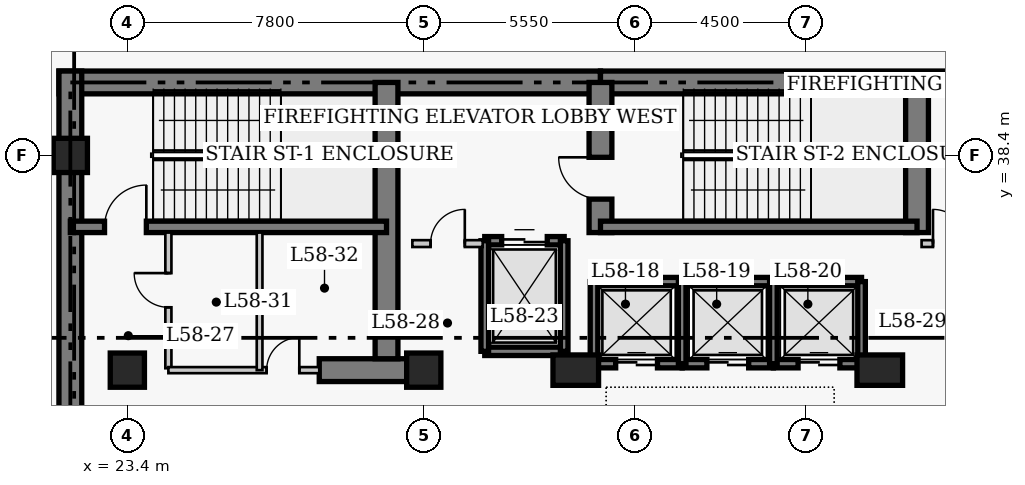
"""IFC4 building model, lengths in metres.
Left out: names, types, materials, properties, quantities, classifications, styles, units other than length and angle.
Written with IfcOpenShell. Run it as: python <this file> out.ifc"""

import sys

from ifc_helpers import new_model, si_unit, direction, frame, frame_2d, origin, origin_2d, place, context, subcontext, project, spatial, rectangle, extrude, element, fill, save


model = new_model("IFC4")
c1 = context("Model", 3, precision=1e-05, world=origin(), true_north=direction((0.0, 1.0)))
c2 = subcontext(c1, "Body", "Model", "MODEL_VIEW")
j1 = project(units=[si_unit("LENGTHUNIT", "METRE"), si_unit("PLANEANGLEUNIT", "RADIAN")], contexts=[c1])
p1 = place(None, origin())
s1 = spatial("IfcSite", under=j1, at=p1, CompositionType="ELEMENT")
p2 = place(p1, origin())
s2 = spatial("IfcBuilding", under=s1, at=p2, CompositionType="ELEMENT")
p3 = place(p2, frame((0.0, 0.0, 231.9)))
s3 = spatial("IfcBuildingStorey", under=s2, at=p3, CompositionType="ELEMENT", Elevation=231.9)
p4 = place(p3, frame((21.6, 40.32, 0.0), z_axis=(0.0, 0.0, 1.0), x_axis=(1.0, 0.0, 0.0)))
e1 = element("IfcWall", 1, at=p4, inside=s3, PredefinedType="SHEAR", context=c2, shape_type="SweptSolid", body=[
    extrude(rectangle(XDim=14.25, YDim=0.6, at=frame_2d((7.125, 0.0))), origin(), (0.0, 0.0, 1.0), 4.6),
])
p5 = place(p3, frame((35.85, 40.32, 0.0), z_axis=(0.0, 0.0, 1.0), x_axis=(1.0, 0.0, 0.0)))
e2 = element("IfcWall", 2, at=p5, inside=s3, PredefinedType="SHEAR", context=c2, shape_type="SweptSolid", body=[
    extrude(rectangle(XDim=12.6, YDim=0.6, at=frame_2d((6.3, 0.0))), origin(), (0.0, 0.0, 1.0), 4.6),
])
p6 = place(p3, frame((21.9, 27.05, 0.0), z_axis=(0.0, 0.0, 1.0), x_axis=(0.0, 1.0, 0.0)))
e3 = element("IfcWall", 3, at=p6, inside=s3, PredefinedType="SHEAR", context=c2, shape_type="SweptSolid", body=[
    extrude(rectangle(XDim=13.57, YDim=0.6, at=frame_2d((6.785, 0.0))), origin(), (0.0, 0.0, 1.0), 4.6),
])
p7 = place(p3, frame((28.45, 32.75, 0.0), z_axis=(0.0, 0.0, 1.0), x_axis=(1.0, 0.0, 0.0)))
e4 = element("IfcWall", 4, at=p7, inside=s3, PredefinedType="SHEAR", context=c2, shape_type="SweptSolid", body=[
    extrude(rectangle(XDim=2.4, YDim=0.6, at=frame_2d((1.2, 0.0))), origin(), (0.0, 0.0, 1.0), 4.6),
])
p8 = place(p3, frame((30.22, 33.05, 0.0), z_axis=(0.0, 0.0, 1.0), x_axis=(0.0, 1.0, 0.0)))
e5 = element("IfcWall", 5, at=p8, inside=s3, PredefinedType="SHEAR", context=c2, shape_type="SweptSolid", body=[
    extrude(rectangle(XDim=7.27, YDim=0.6, at=frame_2d((3.635, 0.0))), origin(), (0.0, 0.0, 1.0), 4.6),
])
p9 = place(p3, frame((35.85, 36.37, 0.0), z_axis=(0.0, 0.0, 1.0), x_axis=(0.0, 1.0, 0.0)))
e6 = element("IfcWall", 6, at=p9, inside=s3, PredefinedType="SHEAR", context=c2, shape_type="SweptSolid", body=[
    extrude(rectangle(XDim=3.95, YDim=0.6, at=frame_2d((1.975, 0.0))), origin(), (0.0, 0.0, 1.0), 4.6),
])
p10 = place(p9, frame((0.88, 0.0, 0.0)))
e7 = element("IfcOpeningElement", 7, at=p10, cuts=e6, PredefinedType="OPENING", context=c2, shape_type="SweptSolid", body=[
    extrude(rectangle(XDim=1.1, YDim=2.15, at=frame_2d((0.55, 1.075))), frame((0.0, 0.31, 0.0), z_axis=(0.0, -1.0, 0.0), x_axis=(1.0, 0.0, 0.0)), (0.0, 0.0, 1.0), 0.62),
])
p11 = place(p3, frame((44.18, 36.37, 0.0), z_axis=(0.0, 0.0, 1.0), x_axis=(0.0, 1.0, 0.0)))
e8 = element("IfcWall", 8, at=p11, inside=s3, PredefinedType="SHEAR", context=c2, shape_type="SweptSolid", body=[
    extrude(rectangle(XDim=3.95, YDim=0.6, at=frame_2d((1.975, 0.0))), origin(), (0.0, 0.0, 1.0), 4.6),
])
p12 = place(p3, frame((21.9, 36.52, 0.0), z_axis=(0.0, 0.0, 1.0), x_axis=(1.0, 0.0, 0.0)))
e9 = element("IfcWall", 9, at=p12, inside=s3, PredefinedType="SHEAR", context=c2, shape_type="SweptSolid", body=[
    extrude(rectangle(XDim=8.32, YDim=0.3, at=frame_2d((4.16, 0.0))), origin(), (0.0, 0.0, 1.0), 4.6),
])
p13 = place(p12, frame((0.9, 0.0, 0.0)))
e10 = element("IfcOpeningElement", 10, at=p13, cuts=e9, PredefinedType="OPENING", context=c2, shape_type="SweptSolid", body=[
    extrude(rectangle(XDim=1.1, YDim=2.15, at=frame_2d((0.55, 1.075))), frame((0.0, 0.16, 0.0), z_axis=(0.0, -1.0, 0.0), x_axis=(1.0, 0.0, 0.0)), (0.0, 0.0, 1.0), 0.32),
])
p14 = place(p3, frame((35.85, 36.52, 0.0), z_axis=(0.0, 0.0, 1.0), x_axis=(1.0, 0.0, 0.0)))
e11 = element("IfcWall", 11, at=p14, inside=s3, PredefinedType="SHEAR", context=c2, shape_type="SweptSolid", body=[
    extrude(rectangle(XDim=8.33, YDim=0.3, at=frame_2d((4.165, 0.0))), origin(), (0.0, 0.0, 1.0), 4.6),
])
for number, where, z_axis, x_axis in (
    (12, (21.9, 38.4, 0.0), (0.0, 0.0, 1.0), (1.0, 0.0, 0.0)),
    (13, (23.4, 32.75, 0.0), (0.0, 0.0, 1.0), (1.0, 0.0, 0.0)),
    (14, (31.2, 32.75, 0.0), (0.0, 0.0, 1.0), (1.0, 0.0, 0.0)),
):
    element("IfcColumn", number, at=place(p3, frame(where, z_axis=z_axis, x_axis=x_axis)), inside=s3, PredefinedType="COLUMN", context=c2, shape_type="SweptSolid", body=[
        extrude(rectangle(XDim=0.9, YDim=0.9, at=origin_2d()), origin(), (0.0, 0.0, 1.0), 4.6),
    ])
for number, where, z_axis, x_axis in (
    (15, (35.2, 32.75, 0.0), (0.0, 0.0, 1.0), (1.0, 0.0, 0.0)),
    (16, (43.2, 32.75, 0.0), (0.0, 0.0, 1.0), (1.0, 0.0, 0.0)),
):
    element("IfcColumn", number, at=place(p3, frame(where, z_axis=z_axis, x_axis=x_axis)), inside=s3, PredefinedType="COLUMN", context=c2, shape_type="SweptSolid", body=[
        extrude(rectangle(XDim=1.2, YDim=0.8, at=origin_2d()), origin(), (0.0, 0.0, 1.0), 4.6),
    ])
p15 = place(p3, frame((35.68, 35.08, 0.0), z_axis=(0.0, 0.0, 1.0), x_axis=(1.0, 0.0, 0.0)))
e17 = element("IfcWall", 17, at=p15, inside=s3, PredefinedType="SHEAR", context=c2, shape_type="SweptSolid", body=[
    extrude(rectangle(XDim=2.32, YDim=0.22, at=frame_2d((1.16, 0.0))), origin(), (0.0, 0.0, 1.0), 4.6),
])
p16 = place(p3, frame((35.68, 32.92, 0.0), z_axis=(0.0, 0.0, 1.0), x_axis=(1.0, 0.0, 0.0)))
e18 = element("IfcWall", 18, at=p16, inside=s3, PredefinedType="SHEAR", context=c2, shape_type="SweptSolid", body=[
    extrude(rectangle(XDim=2.32, YDim=0.22, at=frame_2d((1.16, 0.0))), origin(), (0.0, 0.0, 1.0), 4.6),
])
p17 = place(p16, frame((0.57, 0.0, 0.0)))
e19 = element("IfcOpeningElement", 19, at=p17, cuts=e18, PredefinedType="OPENING", context=c2, shape_type="SweptSolid", body=[
    extrude(rectangle(XDim=1.1, YDim=2.15, at=frame_2d((0.55, 1.075))), frame((0.0, 0.12, 0.0), z_axis=(0.0, -1.0, 0.0), x_axis=(1.0, 0.0, 0.0)), (0.0, 0.0, 1.0), 0.24),
])
p18 = place(p3, frame((35.68, 32.92, 0.0), z_axis=(0.0, 0.0, 1.0), x_axis=(0.0, 1.0, 0.0)))
e20 = element("IfcWall", 20, at=p18, inside=s3, PredefinedType="SHEAR", context=c2, shape_type="SweptSolid", body=[
    extrude(rectangle(XDim=2.16, YDim=0.2, at=frame_2d((1.08, 0.0))), origin(), (0.0, 0.0, 1.0), 4.6),
])
p19 = place(p3, frame((38.0, 35.08, 0.0), z_axis=(0.0, 0.0, 1.0), x_axis=(1.0, 0.0, 0.0)))
e21 = element("IfcWall", 21, at=p19, inside=s3, PredefinedType="SHEAR", context=c2, shape_type="SweptSolid", body=[
    extrude(rectangle(XDim=2.4, YDim=0.22, at=frame_2d((1.2, 0.0))), origin(), (0.0, 0.0, 1.0), 4.6),
])
p20 = place(p3, frame((38.0, 32.92, 0.0), z_axis=(0.0, 0.0, 1.0), x_axis=(1.0, 0.0, 0.0)))
e22 = element("IfcWall", 22, at=p20, inside=s3, PredefinedType="SHEAR", context=c2, shape_type="SweptSolid", body=[
    extrude(rectangle(XDim=2.4, YDim=0.22, at=frame_2d((1.2, 0.0))), origin(), (0.0, 0.0, 1.0), 4.6),
])
p21 = place(p20, frame((0.65, 0.0, 0.0)))
e23 = element("IfcOpeningElement", 23, at=p21, cuts=e22, PredefinedType="OPENING", context=c2, shape_type="SweptSolid", body=[
    extrude(rectangle(XDim=1.1, YDim=2.15, at=frame_2d((0.55, 1.075))), frame((0.0, 0.12, 0.0), z_axis=(0.0, -1.0, 0.0), x_axis=(1.0, 0.0, 0.0)), (0.0, 0.0, 1.0), 0.24),
])
p22 = place(p3, frame((38.0, 32.92, 0.0), z_axis=(0.0, 0.0, 1.0), x_axis=(0.0, 1.0, 0.0)))
e24 = element("IfcWall", 24, at=p22, inside=s3, PredefinedType="SHEAR", context=c2, shape_type="SweptSolid", body=[
    extrude(rectangle(XDim=2.16, YDim=0.2, at=frame_2d((1.08, 0.0))), origin(), (0.0, 0.0, 1.0), 4.6),
])
p23 = place(p3, frame((40.4, 35.08, 0.0), z_axis=(0.0, 0.0, 1.0), x_axis=(1.0, 0.0, 0.0)))
e25 = element("IfcWall", 25, at=p23, inside=s3, PredefinedType="SHEAR", context=c2, shape_type="SweptSolid", body=[
    extrude(rectangle(XDim=2.32, YDim=0.22, at=frame_2d((1.16, 0.0))), origin(), (0.0, 0.0, 1.0), 4.6),
])
p24 = place(p3, frame((40.4, 32.92, 0.0), z_axis=(0.0, 0.0, 1.0), x_axis=(1.0, 0.0, 0.0)))
e26 = element("IfcWall", 26, at=p24, inside=s3, PredefinedType="SHEAR", context=c2, shape_type="SweptSolid", body=[
    extrude(rectangle(XDim=2.32, YDim=0.22, at=frame_2d((1.16, 0.0))), origin(), (0.0, 0.0, 1.0), 4.6),
])
p25 = place(p24, frame((0.65, 0.0, 0.0)))
e27 = element("IfcOpeningElement", 27, at=p25, cuts=e26, PredefinedType="OPENING", context=c2, shape_type="SweptSolid", body=[
    extrude(rectangle(XDim=1.1, YDim=2.15, at=frame_2d((0.55, 1.075))), frame((0.0, 0.12, 0.0), z_axis=(0.0, -1.0, 0.0), x_axis=(1.0, 0.0, 0.0)), (0.0, 0.0, 1.0), 0.24),
])
for number, where, z_axis, x_axis in (
    (28, (40.4, 32.92, 0.0), (0.0, 0.0, 1.0), (0.0, 1.0, 0.0)),
    (29, (42.72, 32.92, 0.0), (0.0, 0.0, 1.0), (0.0, 1.0, 0.0)),
):
    element("IfcWall", number, at=place(p3, frame(where, z_axis=z_axis, x_axis=x_axis)), inside=s3, PredefinedType="SHEAR", context=c2, shape_type="SweptSolid", body=[
        extrude(rectangle(XDim=2.16, YDim=0.2, at=frame_2d((1.08, 0.0))), origin(), (0.0, 0.0, 1.0), 4.6),
    ])
p26 = place(p3, frame((32.805, 36.155, 0.0), z_axis=(0.0, 0.0, 1.0), x_axis=(1.0, 0.0, 0.0)))
e30 = element("IfcWall", 30, at=p26, inside=s3, PredefinedType="SHEAR", context=c2, shape_type="SweptSolid", body=[
    extrude(rectangle(XDim=2.09, YDim=0.22, at=frame_2d((1.045, 0.0))), origin(), (0.0, 0.0, 1.0), 4.6),
])
p27 = place(p26, frame((0.445, 0.0, 0.0)))
e31 = element("IfcOpeningElement", 31, at=p27, cuts=e30, PredefinedType="OPENING", context=c2, shape_type="SweptSolid", body=[
    extrude(rectangle(XDim=1.2, YDim=2.15, at=frame_2d((0.6, 1.075))), frame((0.0, 0.12, 0.0), z_axis=(0.0, -1.0, 0.0), x_axis=(1.0, 0.0, 0.0)), (0.0, 0.0, 1.0), 0.24),
])
p28 = place(p3, frame((32.805, 33.245, 0.0), z_axis=(0.0, 0.0, 1.0), x_axis=(1.0, 0.0, 0.0)))
e32 = element("IfcWall", 32, at=p28, inside=s3, PredefinedType="SHEAR", context=c2, shape_type="SweptSolid", body=[
    extrude(rectangle(XDim=2.09, YDim=0.22, at=frame_2d((1.045, 0.0))), origin(), (0.0, 0.0, 1.0), 4.6),
])
for number, where, z_axis, x_axis in (
    (33, (32.805, 33.245, 0.0), (0.0, 0.0, 1.0), (0.0, 1.0, 0.0)),
    (34, (34.895, 33.245, 0.0), (0.0, 0.0, 1.0), (0.0, 1.0, 0.0)),
):
    element("IfcWall", number, at=place(p3, frame(where, z_axis=z_axis, x_axis=x_axis)), inside=s3, PredefinedType="SHEAR", context=c2, shape_type="SweptSolid", body=[
        extrude(rectangle(XDim=2.91, YDim=0.2, at=frame_2d((1.455, 0.0))), origin(), (0.0, 0.0, 1.0), 4.6),
    ])
p29 = place(p3, frame((30.9, 36.08, 0.0), z_axis=(0.0, 0.0, 1.0), x_axis=(1.0, 0.0, 0.0)))
e35 = element("IfcWall", 35, at=p29, inside=s3, PredefinedType="PARTITIONING", context=c2, shape_type="SweptSolid", body=[
    extrude(rectangle(XDim=1.85, YDim=0.18, at=frame_2d((0.925, 0.0))), origin(), (0.0, 0.0, 1.0), 4.35),
])
p30 = place(p29, frame((0.48, 0.0, 0.0)))
e36 = element("IfcOpeningElement", 36, at=p30, cuts=e35, PredefinedType="OPENING", context=c2, shape_type="SweptSolid", body=[
    extrude(rectangle(XDim=0.9, YDim=2.15, at=frame_2d((0.45, 1.075))), frame((0.0, 0.1, 0.0), z_axis=(0.0, -1.0, 0.0), x_axis=(1.0, 0.0, 0.0)), (0.0, 0.0, 1.0), 0.2),
])
p31 = place(p3, frame((44.3, 36.08, 0.0), z_axis=(0.0, 0.0, 1.0), x_axis=(1.0, 0.0, 0.0)))
e37 = element("IfcWall", 37, at=p31, inside=s3, PredefinedType="PARTITIONING", context=c2, shape_type="SweptSolid", body=[
    extrude(rectangle(XDim=1.5, YDim=0.18, at=frame_2d((0.75, 0.0))), origin(), (0.0, 0.0, 1.0), 4.35),
])
p32 = place(p31, frame((0.3, 0.0, 0.0)))
e38 = element("IfcOpeningElement", 38, at=p32, cuts=e37, PredefinedType="OPENING", context=c2, shape_type="SweptSolid", body=[
    extrude(rectangle(XDim=0.9, YDim=2.15, at=frame_2d((0.45, 1.075))), frame((0.0, 0.1, 0.0), z_axis=(0.0, -1.0, 0.0), x_axis=(1.0, 0.0, 0.0)), (0.0, 0.0, 1.0), 0.2),
])
p33 = place(p3, frame((24.48, 32.8, 0.0), z_axis=(0.0, 0.0, 1.0), x_axis=(0.0, 1.0, 0.0)))
e39 = element("IfcWall", 39, at=p33, inside=s3, PredefinedType="PARTITIONING", context=c2, shape_type="SweptSolid", body=[
    extrude(rectangle(XDim=3.57, YDim=0.16, at=frame_2d((1.785, 0.0))), origin(), (0.0, 0.0, 1.0), 4.35),
])
p34 = place(p33, frame((1.604, 0.0, 0.0)))
e40 = element("IfcOpeningElement", 40, at=p34, cuts=e39, PredefinedType="OPENING", context=c2, shape_type="SweptSolid", body=[
    extrude(rectangle(XDim=0.9, YDim=2.1, at=frame_2d((0.45, 1.05))), frame((0.0, 0.09, 0.0), z_axis=(0.0, -1.0, 0.0), x_axis=(1.0, 0.0, 0.0)), (0.0, 0.0, 1.0), 0.18),
])
p35 = place(p3, frame((24.48, 32.75, 0.0), z_axis=(0.0, 0.0, 1.0), x_axis=(1.0, 0.0, 0.0)))
e41 = element("IfcWall", 41, at=p35, inside=s3, PredefinedType="PARTITIONING", context=c2, shape_type="SweptSolid", body=[
    extrude(rectangle(XDim=3.97, YDim=0.16, at=frame_2d((1.985, 0.0))), origin(), (0.0, 0.0, 1.0), 4.35),
])
p36 = place(p35, frame((2.585, 0.0, 0.0)))
e42 = element("IfcOpeningElement", 42, at=p36, cuts=e41, PredefinedType="OPENING", context=c2, shape_type="SweptSolid", body=[
    extrude(rectangle(XDim=0.86, YDim=2.05, at=frame_2d((0.43, 1.025))), frame((0.0, 0.09, 0.0), z_axis=(0.0, -1.0, 0.0), x_axis=(1.0, 0.0, 0.0)), (0.0, 0.0, 1.0), 0.18),
])
p37 = place(p3, frame((26.88, 32.75, 0.0), z_axis=(0.0, 0.0, 1.0), x_axis=(0.0, 1.0, 0.0)))
e43 = element("IfcWall", 43, at=p37, inside=s3, PredefinedType="PARTITIONING", context=c2, shape_type="SweptSolid", body=[
    extrude(rectangle(XDim=3.62, YDim=0.15, at=frame_2d((1.81, 0.0))), origin(), (0.0, 0.0, 1.0), 4.35),
])
p38 = place(p17, origin())
e44 = element("IfcDoor", 44, at=p38, inside=s3, OperationType="DOUBLE_DOOR_SLIDING", PredefinedType="DOOR", context=c2, shape_type="SweptSolid", body=[
    extrude(rectangle(XDim=1.1, YDim=2.15, at=frame_2d((0.55, 1.075))), frame((0.0, 0.025, 0.0), z_axis=(0.0, -1.0, 0.0), x_axis=(1.0, 0.0, 0.0)), (0.0, 0.0, 1.0), 0.05),
])
fill(e19, e44)
p39 = place(p21, origin())
e45 = element("IfcDoor", 45, at=p39, inside=s3, OperationType="DOUBLE_DOOR_SLIDING", PredefinedType="DOOR", context=c2, shape_type="SweptSolid", body=[
    extrude(rectangle(XDim=1.1, YDim=2.15, at=frame_2d((0.55, 1.075))), frame((0.0, 0.025, 0.0), z_axis=(0.0, -1.0, 0.0), x_axis=(1.0, 0.0, 0.0)), (0.0, 0.0, 1.0), 0.05),
])
fill(e23, e45)
p40 = place(p25, origin())
e46 = element("IfcDoor", 46, at=p40, inside=s3, OperationType="DOUBLE_DOOR_SLIDING", PredefinedType="DOOR", context=c2, shape_type="SweptSolid", body=[
    extrude(rectangle(XDim=1.1, YDim=2.15, at=frame_2d((0.55, 1.075))), frame((0.0, 0.025, 0.0), z_axis=(0.0, -1.0, 0.0), x_axis=(1.0, 0.0, 0.0)), (0.0, 0.0, 1.0), 0.05),
])
fill(e27, e46)
p41 = place(p27, origin())
e47 = element("IfcDoor", 47, at=p41, inside=s3, OperationType="DOUBLE_DOOR_SLIDING", PredefinedType="DOOR", context=c2, shape_type="SweptSolid", body=[
    extrude(rectangle(XDim=1.2, YDim=2.15, at=frame_2d((0.6, 1.075))), frame((0.0, 0.025, 0.0), z_axis=(0.0, -1.0, 0.0), x_axis=(1.0, 0.0, 0.0)), (0.0, 0.0, 1.0), 0.05),
])
fill(e31, e47)
p42 = place(p30, origin())
e48 = element("IfcDoor", 48, at=p42, inside=s3, OperationType="SINGLE_SWING_RIGHT", PredefinedType="DOOR", context=c2, shape_type="SweptSolid", body=[
    extrude(rectangle(XDim=0.9, YDim=2.15, at=frame_2d((0.45, 1.075))), frame((0.0, 0.025, 0.0), z_axis=(0.0, -1.0, 0.0), x_axis=(1.0, 0.0, 0.0)), (0.0, 0.0, 1.0), 0.05),
])
fill(e36, e48)
p43 = place(p32, origin())
e49 = element("IfcDoor", 49, at=p43, inside=s3, OperationType="SINGLE_SWING_LEFT", PredefinedType="DOOR", context=c2, shape_type="SweptSolid", body=[
    extrude(rectangle(XDim=0.9, YDim=2.15, at=frame_2d((0.45, 1.075))), frame((0.0, 0.025, 0.0), z_axis=(0.0, -1.0, 0.0), x_axis=(1.0, 0.0, 0.0)), (0.0, 0.0, 1.0), 0.05),
])
fill(e38, e49)
p44 = place(p34, origin())
e50 = element("IfcDoor", 50, at=p44, inside=s3, OperationType="SINGLE_SWING_RIGHT", PredefinedType="DOOR", context=c2, shape_type="SweptSolid", body=[
    extrude(rectangle(XDim=0.9, YDim=2.1, at=frame_2d((0.45, 1.05))), frame((0.0, 0.025, 0.0), z_axis=(0.0, -1.0, 0.0), x_axis=(1.0, 0.0, 0.0)), (0.0, 0.0, 1.0), 0.05),
])
fill(e40, e50)
p45 = place(p36, origin())
e51 = element("IfcDoor", 51, at=p45, inside=s3, OperationType="SINGLE_SWING_RIGHT", PredefinedType="DOOR", context=c2, shape_type="SweptSolid", body=[
    extrude(rectangle(XDim=0.86, YDim=2.05, at=frame_2d((0.43, 1.025))), frame((0.0, 0.025, 0.0), z_axis=(0.0, -1.0, 0.0), x_axis=(1.0, 0.0, 0.0)), (0.0, 0.0, 1.0), 0.05),
])
fill(e42, e51)
p46 = place(p13, origin())
e52 = element("IfcDoor", 52, at=p46, inside=s3, OperationType="SINGLE_SWING_RIGHT", PredefinedType="DOOR", context=c2, shape_type="SweptSolid", body=[
    extrude(rectangle(XDim=1.1, YDim=2.15, at=frame_2d((0.55, 1.075))), frame((0.0, 0.025, 0.0), z_axis=(0.0, -1.0, 0.0), x_axis=(1.0, 0.0, 0.0)), (0.0, 0.0, 1.0), 0.05),
])
fill(e10, e52)
p47 = place(p10, origin())
e53 = element("IfcDoor", 53, at=p47, inside=s3, OperationType="SINGLE_SWING_RIGHT", PredefinedType="DOOR", context=c2, shape_type="SweptSolid", body=[
    extrude(rectangle(XDim=1.1, YDim=2.15, at=frame_2d((0.55, 1.075))), frame((0.0, 0.025, 0.0), z_axis=(0.0, -1.0, 0.0), x_axis=(1.0, 0.0, 0.0)), (0.0, 0.0, 1.0), 0.05),
])
fill(e7, e53)
save(model, sys.argv[1])
